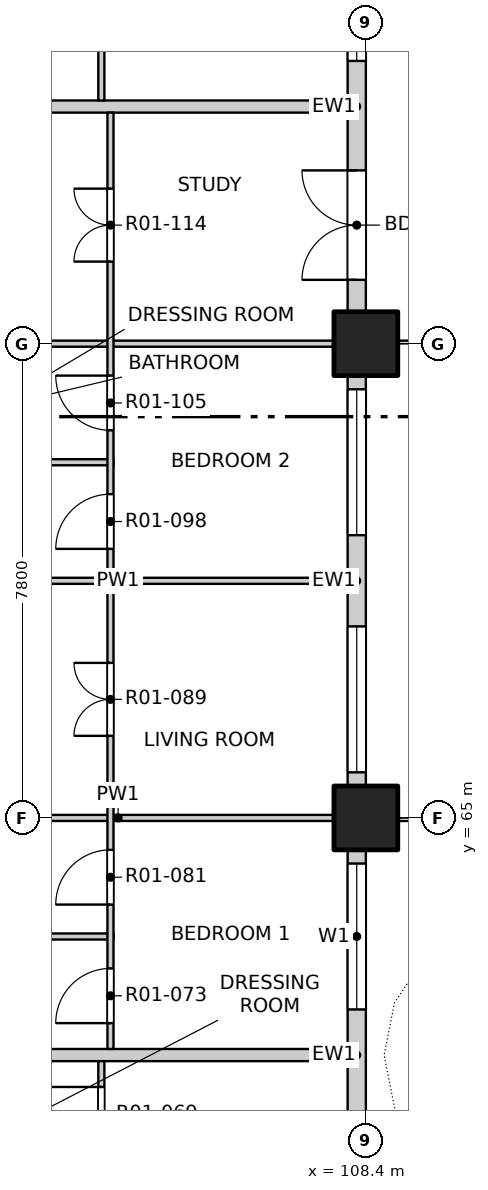
"""IFC4 building model, lengths in metres.
Left out: names, types, materials, properties, quantities, classifications, styles, units other than length and angle.
Written with IfcOpenShell. Run it as: python <this file> out.ifc"""

import sys

from ifc_helpers import new_model, si_unit, direction, frame, frame_2d, origin, origin_2d, place, context, subcontext, project, spatial, rectangle, extrude, element, fill, save


model = new_model("IFC4")
c1 = context("Model", 3, precision=1e-05, world=origin(), true_north=direction((0.0, 1.0)))
c2 = subcontext(c1, "Body", "Model", "MODEL_VIEW")
j1 = project(units=[si_unit("LENGTHUNIT", "METRE"), si_unit("PLANEANGLEUNIT", "RADIAN")], contexts=[c1])
p1 = place(None, origin())
s1 = spatial("IfcSite", under=j1, at=p1, CompositionType="ELEMENT")
p2 = place(p1, origin())
s2 = spatial("IfcBuilding", under=s1, at=p2, CompositionType="ELEMENT")
p3 = place(p2, frame((0.0, 0.0, 26.3)))
s3 = spatial("IfcBuildingStorey", under=s2, at=p3, CompositionType="ELEMENT", Elevation=26.3)
for number, where, z_axis, x_axis in (
    (1, (108.4, 65.0, -0.25), (0.0, 0.0, 1.0), (1.0, 0.0, 0.0)),
    (2, (108.4, 72.8, -0.25), (0.0, 0.0, 1.0), (1.0, 0.0, 0.0)),
):
    element("IfcColumn", number, at=place(p3, frame(where, z_axis=z_axis, x_axis=x_axis)), inside=s3, PredefinedType="COLUMN", context=c2, shape_type="SweptSolid", body=[
        extrude(rectangle(XDim=1.05, YDim=1.05, at=origin_2d()), origin(), (0.0, 0.0, 1.0), 3.4),
    ])
p4 = place(p3, frame((108.25, 57.725, 0.0), z_axis=(0.0, 0.0, 1.0), x_axis=(0.0, 1.0, 0.0)))
e3 = element("IfcWall", 3, at=p4, inside=s3, PredefinedType="SOLIDWALL", context=c2, shape_type="SweptSolid", body=[
    extrude(rectangle(XDim=6.75, YDim=0.3, at=frame_2d((3.375, 0.0))), origin(), (0.0, 0.0, 1.0), 2.7),
])
p5 = place(p4, frame((0.525, 0.0, 0.0)))
e4 = element("IfcOpeningElement", 4, at=p5, cuts=e3, PredefinedType="OPENING", context=c2, shape_type="SweptSolid", body=[
    extrude(rectangle(XDim=1.8, YDim=2.4, at=frame_2d((0.9, 1.2))), frame((0.0, 0.16, 0.0), z_axis=(0.0, -1.0, 0.0), x_axis=(1.0, 0.0, 0.0)), (0.0, 0.0, 1.0), 0.32),
])
p6 = place(p4, frame((4.125, 0.0, 0.9)))
e5 = element("IfcOpeningElement", 5, at=p6, cuts=e3, PredefinedType="OPENING", context=c2, shape_type="SweptSolid", body=[
    extrude(rectangle(XDim=2.4, YDim=1.8, at=frame_2d((1.2, 0.9))), frame((0.0, 0.16, 0.0), z_axis=(0.0, -1.0, 0.0), x_axis=(1.0, 0.0, 0.0)), (0.0, 0.0, 1.0), 0.32),
])
p7 = place(p3, frame((108.25, 65.525, 0.0), z_axis=(0.0, 0.0, 1.0), x_axis=(0.0, 1.0, 0.0)))
e6 = element("IfcWall", 6, at=p7, inside=s3, PredefinedType="SOLIDWALL", context=c2, shape_type="SweptSolid", body=[
    extrude(rectangle(XDim=6.75, YDim=0.3, at=frame_2d((3.375, 0.0))), origin(), (0.0, 0.0, 1.0), 2.7),
])
p8 = place(p7, frame((0.225, 0.0, 0.9)))
e7 = element("IfcOpeningElement", 7, at=p8, cuts=e6, PredefinedType="OPENING", context=c2, shape_type="SweptSolid", body=[
    extrude(rectangle(XDim=2.4, YDim=1.8, at=frame_2d((1.2, 0.9))), frame((0.0, 0.16, 0.0), z_axis=(0.0, -1.0, 0.0), x_axis=(1.0, 0.0, 0.0)), (0.0, 0.0, 1.0), 0.32),
])
p9 = place(p7, frame((4.125, 0.0, 0.9)))
e8 = element("IfcOpeningElement", 8, at=p9, cuts=e6, PredefinedType="OPENING", context=c2, shape_type="SweptSolid", body=[
    extrude(rectangle(XDim=2.4, YDim=1.8, at=frame_2d((1.2, 0.9))), frame((0.0, 0.16, 0.0), z_axis=(0.0, -1.0, 0.0), x_axis=(1.0, 0.0, 0.0)), (0.0, 0.0, 1.0), 0.32),
])
p10 = place(p3, frame((108.25, 73.325, 0.0), z_axis=(0.0, 0.0, 1.0), x_axis=(0.0, 1.0, 0.0)))
e9 = element("IfcWall", 9, at=p10, inside=s3, PredefinedType="SOLIDWALL", context=c2, shape_type="SweptSolid", body=[
    extrude(rectangle(XDim=6.75, YDim=0.3, at=frame_2d((3.375, 0.0))), origin(), (0.0, 0.0, 1.0), 2.7),
])
p11 = place(p10, frame((0.525, 0.0, 0.0)))
e10 = element("IfcOpeningElement", 10, at=p11, cuts=e9, PredefinedType="OPENING", context=c2, shape_type="SweptSolid", body=[
    extrude(rectangle(XDim=1.8, YDim=2.4, at=frame_2d((0.9, 1.2))), frame((0.0, 0.16, 0.0), z_axis=(0.0, -1.0, 0.0), x_axis=(1.0, 0.0, 0.0)), (0.0, 0.0, 1.0), 0.32),
])
p12 = place(p10, frame((4.125, 0.0, 0.9)))
e11 = element("IfcOpeningElement", 11, at=p12, cuts=e9, PredefinedType="OPENING", context=c2, shape_type="SweptSolid", body=[
    extrude(rectangle(XDim=2.4, YDim=1.8, at=frame_2d((1.2, 0.9))), frame((0.0, 0.16, 0.0), z_axis=(0.0, -1.0, 0.0), x_axis=(1.0, 0.0, 0.0)), (0.0, 0.0, 1.0), 0.32),
])
p13 = place(p3, frame((96.6, 61.1, 0.0), z_axis=(0.0, 0.0, 1.0), x_axis=(1.0, 0.0, 0.0)))
e12 = element("IfcWall", 12, at=p13, inside=s3, PredefinedType="PARTITIONING", context=c2, shape_type="SweptSolid", body=[
    extrude(rectangle(XDim=11.5, YDim=0.2, at=frame_2d((5.75, 0.0))), origin(), (0.0, 0.0, 1.0), 3.15),
])
p14 = place(p3, frame((100.55, 63.05, 0.0), z_axis=(0.0, 0.0, 1.0), x_axis=(1.0, 0.0, 0.0)))
e13 = element("IfcWall", 13, at=p14, inside=s3, PredefinedType="PARTITIONING", context=c2, shape_type="SweptSolid", body=[
    extrude(rectangle(XDim=3.7, YDim=0.1, at=frame_2d((1.85, 0.0))), origin(), (0.0, 0.0, 1.0), 3.15),
])
p15 = place(p3, frame((100.55, 65.0, 0.0), z_axis=(0.0, 0.0, 1.0), x_axis=(1.0, 0.0, 0.0)))
e14 = element("IfcWall", 14, at=p15, inside=s3, PredefinedType="PARTITIONING", context=c2, shape_type="SweptSolid", body=[
    extrude(rectangle(XDim=7.55, YDim=0.1, at=frame_2d((3.775, 0.0))), origin(), (0.0, 0.0, 1.0), 2.55),
])
p16 = place(p3, frame((100.55, 68.9, 0.0), z_axis=(0.0, 0.0, 1.0), x_axis=(1.0, 0.0, 0.0)))
e15 = element("IfcWall", 15, at=p16, inside=s3, PredefinedType="PARTITIONING", context=c2, shape_type="SweptSolid", body=[
    extrude(rectangle(XDim=7.55, YDim=0.1, at=frame_2d((3.775, 0.0))), origin(), (0.0, 0.0, 1.0), 3.15),
])
p17 = place(p3, frame((100.55, 70.85, 0.0), z_axis=(0.0, 0.0, 1.0), x_axis=(1.0, 0.0, 0.0)))
e16 = element("IfcWall", 16, at=p17, inside=s3, PredefinedType="PARTITIONING", context=c2, shape_type="SweptSolid", body=[
    extrude(rectangle(XDim=3.7, YDim=0.1, at=frame_2d((1.85, 0.0))), origin(), (0.0, 0.0, 1.0), 3.15),
])
p18 = place(p3, frame((100.55, 72.8, 0.0), z_axis=(0.0, 0.0, 1.0), x_axis=(1.0, 0.0, 0.0)))
e17 = element("IfcWall", 17, at=p18, inside=s3, PredefinedType="PARTITIONING", context=c2, shape_type="SweptSolid", body=[
    extrude(rectangle(XDim=7.55, YDim=0.1, at=frame_2d((3.775, 0.0))), origin(), (0.0, 0.0, 1.0), 2.55),
])
p19 = place(p3, frame((96.6, 76.7, 0.0), z_axis=(0.0, 0.0, 1.0), x_axis=(1.0, 0.0, 0.0)))
e18 = element("IfcWall", 18, at=p19, inside=s3, PredefinedType="PARTITIONING", context=c2, shape_type="SweptSolid", body=[
    extrude(rectangle(XDim=11.5, YDim=0.2, at=frame_2d((5.75, 0.0))), origin(), (0.0, 0.0, 1.0), 3.15),
])
p20 = place(p3, frame((104.05, 41.9, 0.0), z_axis=(0.0, 0.0, 1.0), x_axis=(0.0, 1.0, 0.0)))
e19 = element("IfcWall", 19, at=p20, inside=s3, PredefinedType="PARTITIONING", context=c2, shape_type="SweptSolid", body=[
    extrude(rectangle(XDim=19.1, YDim=0.1, at=frame_2d((9.55, 0.0))), origin(), (0.0, 0.0, 1.0), 3.15),
])
p21 = place(p20, frame((1.05, 0.0, 0.0)))
e20 = element("IfcOpeningElement", 20, at=p21, cuts=e19, PredefinedType="OPENING", context=c2, shape_type="SweptSolid", body=[
    extrude(rectangle(XDim=1.2, YDim=2.1, at=frame_2d((0.6, 1.05))), frame((0.0, 0.06, 0.0), z_axis=(0.0, -1.0, 0.0), x_axis=(1.0, 0.0, 0.0)), (0.0, 0.0, 1.0), 0.12),
])
p22 = place(p20, frame((4.125, 0.0, 0.0)))
e21 = element("IfcOpeningElement", 21, at=p22, cuts=e19, PredefinedType="OPENING", context=c2, shape_type="SweptSolid", body=[
    extrude(rectangle(XDim=0.9, YDim=2.1, at=frame_2d((0.45, 1.05))), frame((0.0, 0.06, 0.0), z_axis=(0.0, -1.0, 0.0), x_axis=(1.0, 0.0, 0.0)), (0.0, 0.0, 1.0), 0.12),
])
p23 = place(p20, frame((6.075, 0.0, 0.0)))
e22 = element("IfcOpeningElement", 22, at=p23, cuts=e19, PredefinedType="OPENING", context=c2, shape_type="SweptSolid", body=[
    extrude(rectangle(XDim=0.9, YDim=2.1, at=frame_2d((0.45, 1.05))), frame((0.0, 0.06, 0.0), z_axis=(0.0, -1.0, 0.0), x_axis=(1.0, 0.0, 0.0)), (0.0, 0.0, 1.0), 0.12),
])
p24 = place(p20, frame((8.85, 0.0, 0.0)))
e23 = element("IfcOpeningElement", 23, at=p24, cuts=e19, PredefinedType="OPENING", context=c2, shape_type="SweptSolid", body=[
    extrude(rectangle(XDim=1.2, YDim=2.1, at=frame_2d((0.6, 1.05))), frame((0.0, 0.06, 0.0), z_axis=(0.0, -1.0, 0.0), x_axis=(1.0, 0.0, 0.0)), (0.0, 0.0, 1.0), 0.12),
])
p25 = place(p20, frame((12.75, 0.0, 0.0)))
e24 = element("IfcOpeningElement", 24, at=p25, cuts=e19, PredefinedType="OPENING", context=c2, shape_type="SweptSolid", body=[
    extrude(rectangle(XDim=1.2, YDim=2.1, at=frame_2d((0.6, 1.05))), frame((0.0, 0.06, 0.0), z_axis=(0.0, -1.0, 0.0), x_axis=(1.0, 0.0, 0.0)), (0.0, 0.0, 1.0), 0.12),
])
p26 = place(p20, frame((15.825, 0.0, 0.0)))
e25 = element("IfcOpeningElement", 25, at=p26, cuts=e19, PredefinedType="OPENING", context=c2, shape_type="SweptSolid", body=[
    extrude(rectangle(XDim=0.9, YDim=2.1, at=frame_2d((0.45, 1.05))), frame((0.0, 0.06, 0.0), z_axis=(0.0, -1.0, 0.0), x_axis=(1.0, 0.0, 0.0)), (0.0, 0.0, 1.0), 0.12),
])
p27 = place(p20, frame((17.775, 0.0, 0.0)))
e26 = element("IfcOpeningElement", 26, at=p27, cuts=e19, PredefinedType="OPENING", context=c2, shape_type="SweptSolid", body=[
    extrude(rectangle(XDim=0.9, YDim=2.1, at=frame_2d((0.45, 1.05))), frame((0.0, 0.06, 0.0), z_axis=(0.0, -1.0, 0.0), x_axis=(1.0, 0.0, 0.0)), (0.0, 0.0, 1.0), 0.12),
])
p28 = place(p3, frame((104.05, 76.8, 0.0), z_axis=(0.0, 0.0, 1.0), x_axis=(0.0, 1.0, 0.0)))
e27 = element("IfcWall", 27, at=p28, inside=s3, PredefinedType="PARTITIONING", context=c2, shape_type="SweptSolid", body=[
    extrude(rectangle(XDim=11.3, YDim=0.1, at=frame_2d((5.65, 0.0))), origin(), (0.0, 0.0, 1.0), 3.15),
])
p29 = place(p28, frame((1.25, 0.0, 0.0)))
e28 = element("IfcOpeningElement", 28, at=p29, cuts=e27, PredefinedType="OPENING", context=c2, shape_type="SweptSolid", body=[
    extrude(rectangle(XDim=1.2, YDim=2.1, at=frame_2d((0.6, 1.05))), frame((0.0, 0.06, 0.0), z_axis=(0.0, -1.0, 0.0), x_axis=(1.0, 0.0, 0.0)), (0.0, 0.0, 1.0), 0.12),
])
p30 = place(p28, frame((5.15, 0.0, 0.0)))
e29 = element("IfcOpeningElement", 29, at=p30, cuts=e27, PredefinedType="OPENING", context=c2, shape_type="SweptSolid", body=[
    extrude(rectangle(XDim=1.2, YDim=2.1, at=frame_2d((0.6, 1.05))), frame((0.0, 0.06, 0.0), z_axis=(0.0, -1.0, 0.0), x_axis=(1.0, 0.0, 0.0)), (0.0, 0.0, 1.0), 0.12),
])
p31 = place(p28, frame((9.05, 0.0, 0.0)))
e30 = element("IfcOpeningElement", 30, at=p31, cuts=e27, PredefinedType="OPENING", context=c2, shape_type="SweptSolid", body=[
    extrude(rectangle(XDim=1.2, YDim=2.1, at=frame_2d((0.6, 1.05))), frame((0.0, 0.06, 0.0), z_axis=(0.0, -1.0, 0.0), x_axis=(1.0, 0.0, 0.0)), (0.0, 0.0, 1.0), 0.12),
])
p32 = place(p3, frame((104.2, 61.2, 0.0), z_axis=(0.0, 0.0, 1.0), x_axis=(0.0, 1.0, 0.0)))
e31 = element("IfcWall", 31, at=p32, inside=s3, PredefinedType="PARTITIONING", context=c2, shape_type="SweptSolid", body=[
    extrude(rectangle(XDim=15.4, YDim=0.1, at=frame_2d((7.7, 0.0))), origin(), (0.0, 0.0, 1.0), 3.15),
])
p33 = place(p32, frame((0.425, 0.0, 0.0)))
e32 = element("IfcOpeningElement", 32, at=p33, cuts=e31, PredefinedType="OPENING", context=c2, shape_type="SweptSolid", body=[
    extrude(rectangle(XDim=0.9, YDim=2.1, at=frame_2d((0.45, 1.05))), frame((0.0, 0.06, 0.0), z_axis=(0.0, -1.0, 0.0), x_axis=(1.0, 0.0, 0.0)), (0.0, 0.0, 1.0), 0.12),
])
p34 = place(p32, frame((2.375, 0.0, 0.0)))
e33 = element("IfcOpeningElement", 33, at=p34, cuts=e31, PredefinedType="OPENING", context=c2, shape_type="SweptSolid", body=[
    extrude(rectangle(XDim=0.9, YDim=2.1, at=frame_2d((0.45, 1.05))), frame((0.0, 0.06, 0.0), z_axis=(0.0, -1.0, 0.0), x_axis=(1.0, 0.0, 0.0)), (0.0, 0.0, 1.0), 0.12),
])
p35 = place(p32, frame((5.15, 0.0, 0.0)))
e34 = element("IfcOpeningElement", 34, at=p35, cuts=e31, PredefinedType="OPENING", context=c2, shape_type="SweptSolid", body=[
    extrude(rectangle(XDim=1.2, YDim=2.1, at=frame_2d((0.6, 1.05))), frame((0.0, 0.06, 0.0), z_axis=(0.0, -1.0, 0.0), x_axis=(1.0, 0.0, 0.0)), (0.0, 0.0, 1.0), 0.12),
])
p36 = place(p32, frame((8.225, 0.0, 0.0)))
e35 = element("IfcOpeningElement", 35, at=p36, cuts=e31, PredefinedType="OPENING", context=c2, shape_type="SweptSolid", body=[
    extrude(rectangle(XDim=0.9, YDim=2.1, at=frame_2d((0.45, 1.05))), frame((0.0, 0.06, 0.0), z_axis=(0.0, -1.0, 0.0), x_axis=(1.0, 0.0, 0.0)), (0.0, 0.0, 1.0), 0.12),
])
p37 = place(p32, frame((10.175, 0.0, 0.0)))
e36 = element("IfcOpeningElement", 36, at=p37, cuts=e31, PredefinedType="OPENING", context=c2, shape_type="SweptSolid", body=[
    extrude(rectangle(XDim=0.9, YDim=2.1, at=frame_2d((0.45, 1.05))), frame((0.0, 0.06, 0.0), z_axis=(0.0, -1.0, 0.0), x_axis=(1.0, 0.0, 0.0)), (0.0, 0.0, 1.0), 0.12),
])
p38 = place(p32, frame((12.95, 0.0, 0.0)))
e37 = element("IfcOpeningElement", 37, at=p38, cuts=e31, PredefinedType="OPENING", context=c2, shape_type="SweptSolid", body=[
    extrude(rectangle(XDim=1.2, YDim=2.1, at=frame_2d((0.6, 1.05))), frame((0.0, 0.06, 0.0), z_axis=(0.0, -1.0, 0.0), x_axis=(1.0, 0.0, 0.0)), (0.0, 0.0, 1.0), 0.12),
])
p39 = place(p6, origin())
e38 = element("IfcWindow", 38, at=p39, inside=s3, PartitioningType="DOUBLE_PANEL_VERTICAL", PredefinedType="WINDOW", context=c2, shape_type="SweptSolid", body=[
    extrude(rectangle(XDim=2.4, YDim=1.8, at=frame_2d((1.2, 0.9))), frame((0.0, 0.03, 0.0), z_axis=(0.0, -1.0, 0.0), x_axis=(1.0, 0.0, 0.0)), (0.0, 0.0, 1.0), 0.06),
])
fill(e5, e38)
p40 = place(p8, origin())
e39 = element("IfcWindow", 39, at=p40, inside=s3, PartitioningType="DOUBLE_PANEL_VERTICAL", PredefinedType="WINDOW", context=c2, shape_type="SweptSolid", body=[
    extrude(rectangle(XDim=2.4, YDim=1.8, at=frame_2d((1.2, 0.9))), frame((0.0, 0.03, 0.0), z_axis=(0.0, -1.0, 0.0), x_axis=(1.0, 0.0, 0.0)), (0.0, 0.0, 1.0), 0.06),
])
fill(e7, e39)
p41 = place(p9, origin())
e40 = element("IfcWindow", 40, at=p41, inside=s3, PartitioningType="DOUBLE_PANEL_VERTICAL", PredefinedType="WINDOW", context=c2, shape_type="SweptSolid", body=[
    extrude(rectangle(XDim=2.4, YDim=1.8, at=frame_2d((1.2, 0.9))), frame((0.0, 0.03, 0.0), z_axis=(0.0, -1.0, 0.0), x_axis=(1.0, 0.0, 0.0)), (0.0, 0.0, 1.0), 0.06),
])
fill(e8, e40)
p42 = place(p11, origin())
e41 = element("IfcDoor", 41, at=p42, inside=s3, OperationType="DOUBLE_DOOR_SINGLE_SWING", PredefinedType="DOOR", context=c2, shape_type="SweptSolid", body=[
    extrude(rectangle(XDim=1.8, YDim=2.4, at=frame_2d((0.9, 1.2))), frame((0.0, 0.025, 0.0), z_axis=(0.0, -1.0, 0.0), x_axis=(1.0, 0.0, 0.0)), (0.0, 0.0, 1.0), 0.05),
])
fill(e10, e41)
p43 = place(p12, origin())
e42 = element("IfcWindow", 42, at=p43, inside=s3, PartitioningType="DOUBLE_PANEL_VERTICAL", PredefinedType="WINDOW", context=c2, shape_type="SweptSolid", body=[
    extrude(rectangle(XDim=2.4, YDim=1.8, at=frame_2d((1.2, 0.9))), frame((0.0, 0.03, 0.0), z_axis=(0.0, -1.0, 0.0), x_axis=(1.0, 0.0, 0.0)), (0.0, 0.0, 1.0), 0.06),
])
fill(e11, e42)
p44 = place(p27, origin())
e43 = element("IfcDoor", 43, at=p44, inside=s3, OperationType="SINGLE_SWING_RIGHT", PredefinedType="DOOR", context=c2, shape_type="SweptSolid", body=[
    extrude(rectangle(XDim=0.9, YDim=2.1, at=frame_2d((0.45, 1.05))), frame((0.0, 0.025, 0.0), z_axis=(0.0, -1.0, 0.0), x_axis=(1.0, 0.0, 0.0)), (0.0, 0.0, 1.0), 0.05),
])
fill(e26, e43)
p45 = place(p33, origin())
e44 = element("IfcDoor", 44, at=p45, inside=s3, OperationType="SINGLE_SWING_LEFT", PredefinedType="DOOR", context=c2, shape_type="SweptSolid", body=[
    extrude(rectangle(XDim=0.9, YDim=2.1, at=frame_2d((0.45, 1.05))), frame((0.0, 0.025, 0.0), z_axis=(0.0, -1.0, 0.0), x_axis=(1.0, 0.0, 0.0)), (0.0, 0.0, 1.0), 0.05),
])
fill(e32, e44)
p46 = place(p34, origin())
e45 = element("IfcDoor", 45, at=p46, inside=s3, OperationType="SINGLE_SWING_LEFT", PredefinedType="DOOR", context=c2, shape_type="SweptSolid", body=[
    extrude(rectangle(XDim=0.9, YDim=2.1, at=frame_2d((0.45, 1.05))), frame((0.0, 0.025, 0.0), z_axis=(0.0, -1.0, 0.0), x_axis=(1.0, 0.0, 0.0)), (0.0, 0.0, 1.0), 0.05),
])
fill(e33, e45)
p47 = place(p35, origin())
e46 = element("IfcDoor", 46, at=p47, inside=s3, OperationType="DOUBLE_DOOR_SINGLE_SWING", PredefinedType="DOOR", context=c2, shape_type="SweptSolid", body=[
    extrude(rectangle(XDim=1.2, YDim=2.1, at=frame_2d((0.6, 1.05))), frame((0.0, 0.025, 0.0), z_axis=(0.0, -1.0, 0.0), x_axis=(1.0, 0.0, 0.0)), (0.0, 0.0, 1.0), 0.05),
])
fill(e34, e46)
p48 = place(p36, origin())
e47 = element("IfcDoor", 47, at=p48, inside=s3, OperationType="SINGLE_SWING_LEFT", PredefinedType="DOOR", context=c2, shape_type="SweptSolid", body=[
    extrude(rectangle(XDim=0.9, YDim=2.1, at=frame_2d((0.45, 1.05))), frame((0.0, 0.025, 0.0), z_axis=(0.0, -1.0, 0.0), x_axis=(1.0, 0.0, 0.0)), (0.0, 0.0, 1.0), 0.05),
])
fill(e35, e47)
p49 = place(p37, origin())
e48 = element("IfcDoor", 48, at=p49, inside=s3, OperationType="SINGLE_SWING_RIGHT", PredefinedType="DOOR", context=c2, shape_type="SweptSolid", body=[
    extrude(rectangle(XDim=0.9, YDim=2.1, at=frame_2d((0.45, 1.05))), frame((0.0, 0.025, 0.0), z_axis=(0.0, -1.0, 0.0), x_axis=(1.0, 0.0, 0.0)), (0.0, 0.0, 1.0), 0.05),
])
fill(e36, e48)
p50 = place(p38, origin())
e49 = element("IfcDoor", 49, at=p50, inside=s3, OperationType="DOUBLE_DOOR_SINGLE_SWING", PredefinedType="DOOR", context=c2, shape_type="SweptSolid", body=[
    extrude(rectangle(XDim=1.2, YDim=2.1, at=frame_2d((0.6, 1.05))), frame((0.0, 0.025, 0.0), z_axis=(0.0, -1.0, 0.0), x_axis=(1.0, 0.0, 0.0)), (0.0, 0.0, 1.0), 0.05),
])
fill(e37, e49)
save(model, sys.argv[1])
